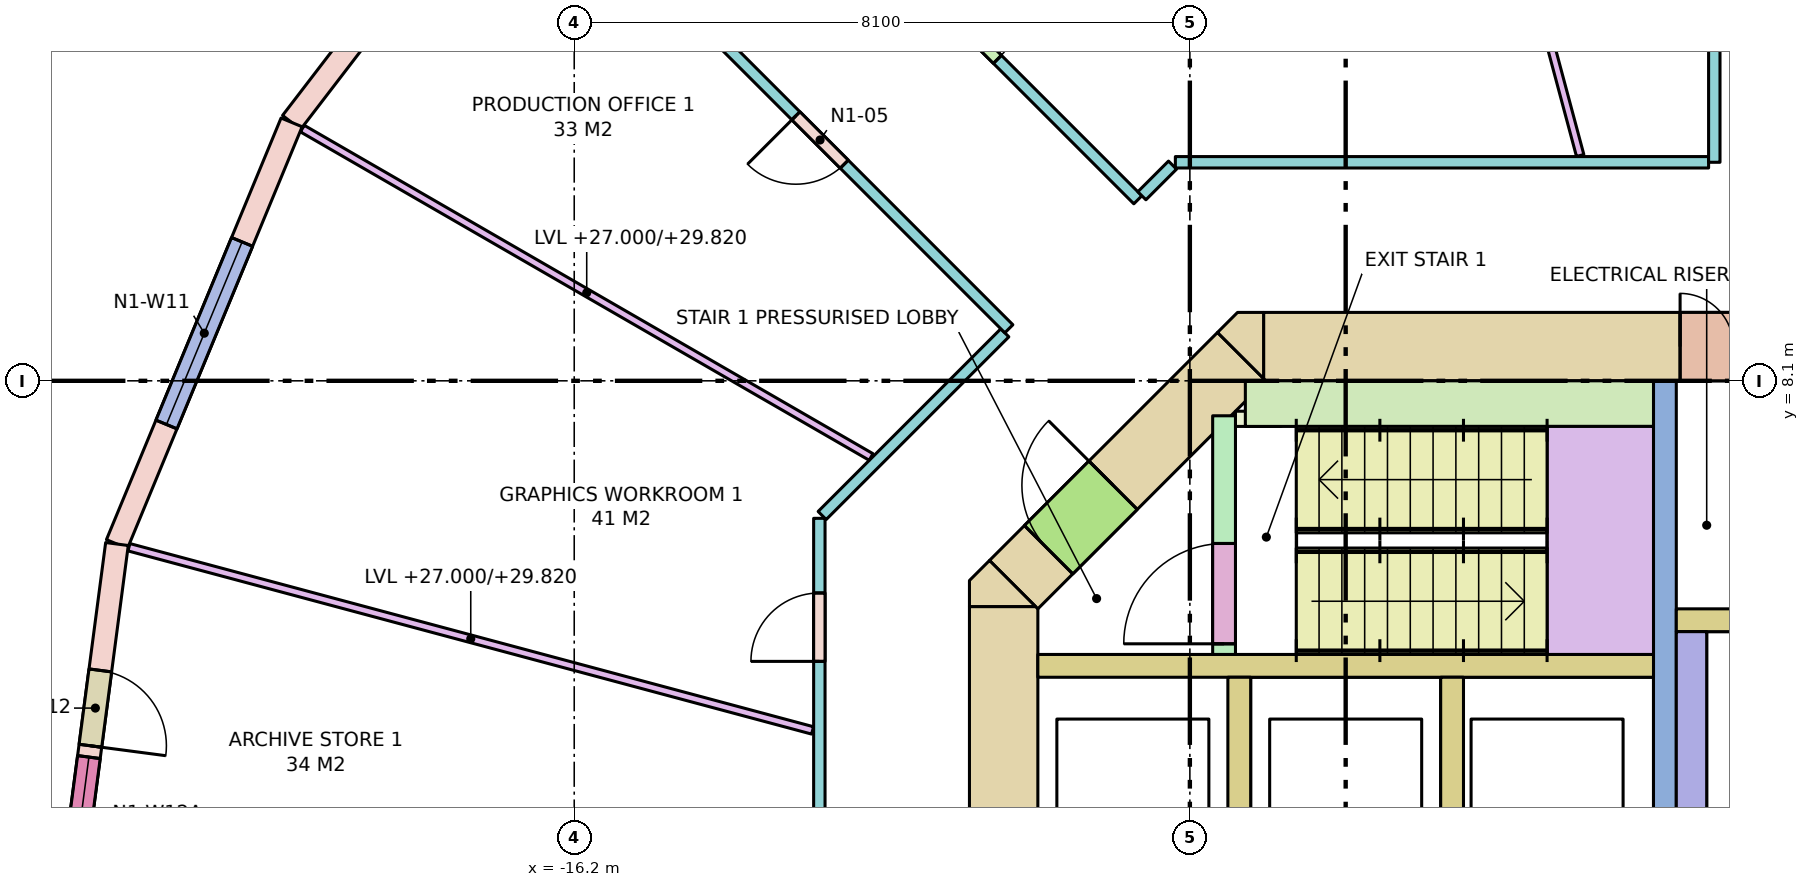
"""IFC4 building model, lengths in metres.
Left out: names, types, materials, properties, quantities, classifications, styles, units other than length and angle.
Written with IfcOpenShell. Run it as: python <this file> out.ifc"""

import sys

from ifc_helpers import new_model, si_unit, direction, frame, frame_2d, origin, place, context, subcontext, project, spatial, polyline, rectangle, outline, extrude, element, fill, save


model = new_model("IFC4")
c1 = context("Model", 3, precision=1e-05, world=origin(), true_north=direction((0.0, 1.0)))
c2 = subcontext(c1, "Body", "Model", "MODEL_VIEW")
j1 = project(units=[si_unit("LENGTHUNIT", "METRE"), si_unit("PLANEANGLEUNIT", "RADIAN")], contexts=[c1])
p1 = place(None, origin())
s1 = spatial("IfcSite", under=j1, at=p1, CompositionType="ELEMENT")
p2 = place(p1, origin())
s2 = spatial("IfcBuilding", under=s1, at=p2, CompositionType="ELEMENT")
p3 = place(p2, frame((0.0, 0.0, 27.0)))
s3 = spatial("IfcBuildingStorey", under=s2, at=p3, CompositionType="ELEMENT", Elevation=27.0)
p4 = place(p3, frame((-7.13, 8.55, -0.28), z_axis=(0.0, 0.0, 1.0), x_axis=(1.0, 0.0, 0.0)))
e1 = element("IfcWall", 1, at=p4, inside=s3, PredefinedType="SHEAR", context=c2, shape_type="SweptSolid", body=[
    extrude(rectangle(XDim=14.26, YDim=0.9, at=frame_2d((7.13, 0.0))), origin(), (0.0, 0.0, 1.0), 4.0),
])
p5 = place(p4, frame((5.48, 0.0, 0.28)))
e2 = element("IfcOpeningElement", 2, at=p5, cuts=e1, PredefinedType="OPENING", context=c2, shape_type="SweptSolid", body=[
    extrude(rectangle(XDim=0.7, YDim=2.1, at=frame_2d((0.35, 1.05))), frame((0.0, 0.46, 0.0), z_axis=(0.0, -1.0, 0.0), x_axis=(1.0, 0.0, 0.0)), (0.0, 0.0, 1.0), 0.92),
])
p6 = place(p4, frame((7.155, 0.0, 0.28)))
e3 = element("IfcOpeningElement", 3, at=p6, cuts=e1, PredefinedType="OPENING", context=c2, shape_type="SweptSolid", body=[
    extrude(rectangle(XDim=0.9, YDim=2.1, at=frame_2d((0.45, 1.05))), frame((0.0, 0.46, 0.0), z_axis=(0.0, -1.0, 0.0), x_axis=(1.0, 0.0, 0.0)), (0.0, 0.0, 1.0), 0.92),
])
p7 = place(p3, frame((-10.55, -5.13, -0.28), z_axis=(0.0, 0.0, 1.0), x_axis=(0.0, 1.0, 0.0)))
e4 = element("IfcWall", 4, at=p7, inside=s3, PredefinedType="SHEAR", context=c2, shape_type="SweptSolid", body=[
    extrude(rectangle(XDim=10.26, YDim=0.9, at=frame_2d((5.13, 0.0))), origin(), (0.0, 0.0, 1.0), 4.0),
])
p8 = place(p7, frame((4.13, 0.0, 0.28)))
e5 = element("IfcOpeningElement", 5, at=p8, cuts=e4, PredefinedType="OPENING", context=c2, shape_type="SweptSolid", body=[
    extrude(rectangle(XDim=2.0, YDim=2.1, at=frame_2d((1.0, 1.05))), frame((0.0, 0.46, 0.0), z_axis=(0.0, -1.0, 0.0), x_axis=(1.0, 0.0, 0.0)), (0.0, 0.0, 1.0), 0.92),
])
p9 = place(p3, frame((-10.418, 5.418, -0.28), z_axis=(0.0, 0.0, 1.0), x_axis=(0.707106781187, 0.707106781187, 0.0)))
e6 = element("IfcWall", 6, at=p9, inside=s3, PredefinedType="SHEAR", context=c2, shape_type="SweptSolid", body=[
    extrude(rectangle(XDim=4.243, YDim=0.9, at=frame_2d((2.121, 0.0))), origin(), (0.0, 0.0, 1.0), 4.0),
])
p10 = place(p9, frame((0.65, 0.0, 0.28)))
e7 = element("IfcOpeningElement", 7, at=p10, cuts=e6, PredefinedType="OPENING", context=c2, shape_type="SweptSolid", body=[
    extrude(rectangle(XDim=1.2, YDim=2.1, at=frame_2d((0.6, 1.05))), frame((0.0, 0.46, 0.0), z_axis=(0.0, -1.0, 0.0), x_axis=(1.0, 0.0, 0.0)), (0.0, 0.0, 1.0), 0.92),
])
p11 = place(p3, frame((0.0, 0.0, -0.28)))
e8 = element("IfcWall", 8, at=p11, inside=s3, PredefinedType="SHEAR", context=c2, shape_type="SweptSolid", body=[
    extrude(outline(polyline([(-10.736, 5.736), (-10.13, 5.13), (-11.0, 5.13), (-11.0, 5.473), (-10.736, 5.736)])), origin(), (0.0, 0.0, 1.0), 4.0),
])
p12 = place(p3, frame((0.0, 0.0, -0.28)))
e9 = element("IfcWall", 9, at=p12, inside=s3, PredefinedType="SHEAR", context=c2, shape_type="SweptSolid", body=[
    extrude(outline(polyline([(-7.473, 9.0), (-7.13, 9.0), (-7.13, 8.13), (-7.736, 8.736), (-7.473, 9.0)])), origin(), (0.0, 0.0, 1.0), 4.0),
])
p13 = place(p3, frame((-10.1, 4.35, 0.0), z_axis=(0.0, 0.0, 1.0), x_axis=(1.0, 0.0, 0.0)))
e10 = element("IfcWall", 10, at=p13, inside=s3, PredefinedType="SOLIDWALL", context=c2, shape_type="SweptSolid", body=[
    extrude(rectangle(XDim=8.1, YDim=0.3, at=frame_2d((4.05, 0.0))), origin(), (0.0, 0.0, 1.0), 3.72),
])
for number, where, z_axis, x_axis in (
    (11, (-7.45, 1.8, 0.0), (0.0, 0.0, 1.0), (0.0, 1.0, 0.0)),
    (12, (-4.65, 1.8, 0.0), (0.0, 0.0, 1.0), (0.0, 1.0, 0.0)),
):
    element("IfcWall", number, at=place(p3, frame(where, z_axis=z_axis, x_axis=x_axis)), inside=s3, PredefinedType="SOLIDWALL", context=c2, shape_type="SweptSolid", body=[
        extrude(rectangle(XDim=2.4, YDim=0.3, at=frame_2d((1.2, 0.0))), origin(), (0.0, 0.0, 1.0), 3.72),
    ])
p14 = place(p3, frame((-1.85, 1.5, 0.0), z_axis=(0.0, 0.0, 1.0), x_axis=(0.0, 1.0, 0.0)))
e13 = element("IfcWall", 13, at=p14, inside=s3, PredefinedType="SHEAR", context=c2, shape_type="SweptSolid", body=[
    extrude(rectangle(XDim=6.6, YDim=0.3, at=frame_2d((3.3, 0.0))), origin(), (0.0, 0.0, 1.0), 3.72),
])
p15 = place(p3, frame((-1.5, 1.8, 0.0), z_axis=(0.0, 0.0, 1.0), x_axis=(0.0, 1.0, 0.0)))
e14 = element("IfcWall", 14, at=p15, inside=s3, PredefinedType="SOLIDWALL", context=c2, shape_type="SweptSolid", body=[
    extrude(rectangle(XDim=3.0, YDim=0.4, at=frame_2d((1.5, 0.0))), origin(), (0.0, 0.0, 1.0), 3.72),
])
p16 = place(p3, frame((-1.7, 4.95, 0.0), z_axis=(0.0, 0.0, 1.0), x_axis=(1.0, 0.0, 0.0)))
e15 = element("IfcWall", 15, at=p16, inside=s3, PredefinedType="SOLIDWALL", context=c2, shape_type="SweptSolid", body=[
    extrude(rectangle(XDim=3.4, YDim=0.3, at=frame_2d((1.7, 0.0))), origin(), (0.0, 0.0, 1.0), 3.72),
])
p17 = place(p3, frame((-7.65, 4.5, 0.0), z_axis=(0.0, 0.0, 1.0), x_axis=(0.0, 1.0, 0.0)))
e16 = element("IfcWall", 16, at=p17, inside=s3, PredefinedType="SHEAR", context=c2, shape_type="SweptSolid", body=[
    extrude(rectangle(XDim=3.14, YDim=0.3, at=frame_2d((1.57, 0.0))), origin(), (0.0, 0.0, 1.0), 3.72),
])
p18 = place(p17, frame((0.14, 0.0, 0.0)))
e17 = element("IfcOpeningElement", 17, at=p18, cuts=e16, PredefinedType="OPENING", context=c2, shape_type="SweptSolid", body=[
    extrude(rectangle(XDim=1.32, YDim=2.1, at=frame_2d((0.66, 1.05))), frame((0.0, 0.16, 0.0), z_axis=(0.0, -1.0, 0.0), x_axis=(1.0, 0.0, 0.0)), (0.0, 0.0, 1.0), 0.32),
])
p19 = place(p3, frame((-7.37, 7.8, 0.0), z_axis=(0.0, 0.0, 1.0), x_axis=(1.0, 0.0, 0.0)))
e18 = element("IfcWall", 18, at=p19, inside=s3, PredefinedType="SHEAR", context=c2, shape_type="SweptSolid", body=[
    extrude(rectangle(XDim=5.37, YDim=0.6, at=frame_2d((2.685, 0.0))), origin(), (0.0, 0.0, 1.0), 3.72),
])
p20 = place(p3, frame((-7.5, 7.6, 0.0), z_axis=(0.0, 0.0, 1.0), x_axis=(1.0, 0.0, 0.0)))
e19 = element("IfcWall", 19, at=p20, inside=s3, PredefinedType="SHEAR", context=c2, shape_type="SweptSolid", body=[
    extrude(rectangle(XDim=0.6, YDim=0.2, at=frame_2d((0.3, 0.0))), origin(), (0.0, 0.0, 1.0), 3.72),
])
p21 = place(p3, frame((-16.263, 16.263, 0.0), z_axis=(0.0, 0.0, 1.0), x_axis=(-0.608778912074, -0.793339924758, 0.0)))
e20 = element("IfcWall", 20, at=p21, inside=s3, PredefinedType="STANDARD", context=c2, shape_type="SweptSolid", body=[
    extrude(rectangle(XDim=6.004, YDim=0.3, at=frame_2d((3.002, 0.0))), origin(), (0.0, 0.0, 1.0), 3.72),
])
p22 = place(p21, frame((1.677, 0.0, 0.0)))
e21 = element("IfcOpeningElement", 21, at=p22, cuts=e20, PredefinedType="OPENING", context=c2, shape_type="SweptSolid", body=[
    extrude(rectangle(XDim=1.0, YDim=2.4, at=frame_2d((0.5, 1.2))), frame((0.0, 0.16, 0.0), z_axis=(0.0, -1.0, 0.0), x_axis=(1.0, 0.0, 0.0)), (0.0, 0.0, 1.0), 0.32),
])
p23 = place(p21, frame((2.827, 0.0, 0.8)))
e22 = element("IfcOpeningElement", 22, at=p23, cuts=e20, PredefinedType="OPENING", context=c2, shape_type="SweptSolid", body=[
    extrude(rectangle(XDim=1.5, YDim=2.7, at=frame_2d((0.75, 1.35))), frame((0.0, 0.16, 0.0), z_axis=(0.0, -1.0, 0.0), x_axis=(1.0, 0.0, 0.0)), (0.0, 0.0, 1.0), 0.32),
])
p24 = place(p3, frame((-19.919, 11.5, 0.0), z_axis=(0.0, 0.0, 1.0), x_axis=(-0.382671411433, -0.923884511653, 0.0)))
e23 = element("IfcWall", 23, at=p24, inside=s3, PredefinedType="STANDARD", context=c2, shape_type="SweptSolid", body=[
    extrude(rectangle(XDim=6.004, YDim=0.3, at=frame_2d((3.002, 0.0))), origin(), (0.0, 0.0, 1.0), 3.72),
])
p25 = place(p24, frame((1.702, 0.0, 0.8)))
e24 = element("IfcOpeningElement", 24, at=p25, cuts=e23, PredefinedType="OPENING", context=c2, shape_type="SweptSolid", body=[
    extrude(rectangle(XDim=2.6, YDim=2.7, at=frame_2d((1.3, 1.35))), frame((0.0, 0.16, 0.0), z_axis=(0.0, -1.0, 0.0), x_axis=(1.0, 0.0, 0.0)), (0.0, 0.0, 1.0), 0.32),
])
p26 = place(p3, frame((-22.216, 5.953, 0.0), z_axis=(0.0, 0.0, 1.0), x_axis=(-0.130522880875, -0.991445297315, 0.0)))
e25 = element("IfcWall", 25, at=p26, inside=s3, PredefinedType="STANDARD", context=c2, shape_type="SweptSolid", body=[
    extrude(rectangle(XDim=6.004, YDim=0.3, at=frame_2d((3.002, 0.0))), origin(), (0.0, 0.0, 1.0), 3.72),
])
p27 = place(p26, frame((1.677, 0.0, 0.0)))
e26 = element("IfcOpeningElement", 26, at=p27, cuts=e25, PredefinedType="OPENING", context=c2, shape_type="SweptSolid", body=[
    extrude(rectangle(XDim=1.0, YDim=2.4, at=frame_2d((0.5, 1.2))), frame((0.0, 0.16, 0.0), z_axis=(0.0, -1.0, 0.0), x_axis=(1.0, 0.0, 0.0)), (0.0, 0.0, 1.0), 0.32),
])
p28 = place(p26, frame((2.827, 0.0, 0.8)))
e27 = element("IfcOpeningElement", 27, at=p28, cuts=e25, PredefinedType="OPENING", context=c2, shape_type="SweptSolid", body=[
    extrude(rectangle(XDim=1.5, YDim=2.7, at=frame_2d((0.75, 1.35))), frame((0.0, 0.16, 0.0), z_axis=(0.0, -1.0, 0.0), x_axis=(1.0, 0.0, 0.0)), (0.0, 0.0, 1.0), 0.32),
])
p29 = place(p3, frame((-12.975, 1.275, 0.0), z_axis=(0.0, 0.0, 1.0), x_axis=(0.0, 1.0, 0.0)))
e28 = element("IfcWall", 28, at=p29, inside=s3, PredefinedType="PARTITIONING", context=c2, shape_type="SweptSolid", body=[
    extrude(rectangle(XDim=5.016, YDim=0.15, at=frame_2d((2.508, 0.0))), origin(), (0.0, 0.0, 1.0), 2.82),
])
p30 = place(p29, frame((3.134, 0.0, 0.0)))
e29 = element("IfcOpeningElement", 29, at=p30, cuts=e28, PredefinedType="OPENING", context=c2, shape_type="SweptSolid", body=[
    extrude(rectangle(XDim=0.9, YDim=2.1, at=frame_2d((0.45, 1.05))), frame((0.0, 0.085, 0.0), z_axis=(0.0, -1.0, 0.0), x_axis=(1.0, 0.0, 0.0)), (0.0, 0.0, 1.0), 0.17),
])
p31 = place(p3, frame((-12.938, 6.328, 0.0), z_axis=(0.0, 0.0, 1.0), x_axis=(0.707106781187, 0.707106781187, 0.0)))
e30 = element("IfcWall", 30, at=p31, inside=s3, PredefinedType="PARTITIONING", context=c2, shape_type="SweptSolid", body=[
    extrude(rectangle(XDim=3.399, YDim=0.15, at=frame_2d((1.7, 0.0))), origin(), (0.0, 0.0, 1.0), 2.82),
])
p32 = place(p3, frame((-10.481, 8.784, 0.0), z_axis=(0.0, 0.0, 1.0), x_axis=(-0.707124155885, 0.707089406061, 0.0)))
e31 = element("IfcWall", 31, at=p32, inside=s3, PredefinedType="PARTITIONING", context=c2, shape_type="SweptSolid", body=[
    extrude(rectangle(XDim=7.026, YDim=0.15, at=frame_2d((3.513, 0.0))), origin(), (0.0, 0.0, 1.0), 3.72),
])
p33 = place(p32, frame((3.063, 0.0, 0.0)))
e32 = element("IfcOpeningElement", 32, at=p33, cuts=e31, PredefinedType="OPENING", context=c2, shape_type="SweptSolid", body=[
    extrude(rectangle(XDim=0.9, YDim=2.1, at=frame_2d((0.45, 1.05))), frame((0.0, 0.085, 0.0), z_axis=(0.0, -1.0, 0.0), x_axis=(1.0, 0.0, 0.0)), (0.0, 0.0, 1.0), 0.17),
])
p34 = place(p3, frame((-13.752, 15.449, 0.0), z_axis=(0.0, 0.0, 1.0), x_axis=(0.707089406061, -0.707124155885, 0.0)))
e33 = element("IfcWall", 33, at=p34, inside=s3, PredefinedType="PARTITIONING", context=c2, shape_type="SweptSolid", body=[
    extrude(rectangle(XDim=7.026, YDim=0.15, at=frame_2d((3.513, 0.0))), origin(), (0.0, 0.0, 1.0), 3.72),
])
p35 = place(p34, frame((2.613, 0.0, 0.0)))
e34 = element("IfcOpeningElement", 34, at=p35, cuts=e33, PredefinedType="OPENING", context=c2, shape_type="SweptSolid", body=[
    extrude(rectangle(XDim=1.8, YDim=2.1, at=frame_2d((0.9, 1.05))), frame((0.0, 0.085, 0.0), z_axis=(0.0, -1.0, 0.0), x_axis=(1.0, 0.0, 0.0)), (0.0, 0.0, 1.0), 0.17),
])
p36 = place(p3, frame((-8.731, 10.534, 0.0), z_axis=(0.0, 0.0, 1.0), x_axis=(0.707106781187, 0.707106781187, 0.0)))
e35 = element("IfcWall", 35, at=p36, inside=s3, PredefinedType="PARTITIONING", context=c2, shape_type="SweptSolid", body=[
    extrude(rectangle(XDim=0.571, YDim=0.15, at=frame_2d((0.285, 0.0))), origin(), (0.0, 0.0, 1.0), 3.72),
])
p37 = place(p3, frame((-8.291, 10.975, 0.0), z_axis=(0.0, 0.0, 1.0), x_axis=(1.0, 0.0, 0.0)))
e36 = element("IfcWall", 36, at=p37, inside=s3, PredefinedType="PARTITIONING", context=c2, shape_type="SweptSolid", body=[
    extrude(rectangle(XDim=7.016, YDim=0.15, at=frame_2d((3.508, 0.0))), origin(), (0.0, 0.0, 1.0), 2.82),
])
p38 = place(p3, frame((-1.2, 10.975, 0.0), z_axis=(0.0, 0.0, 1.0), x_axis=(0.0, 1.0, 0.0)))
e37 = element("IfcWall", 37, at=p38, inside=s3, PredefinedType="PARTITIONING", context=c2, shape_type="SweptSolid", body=[
    extrude(rectangle(XDim=9.674, YDim=0.15, at=frame_2d((4.837, 0.0))), origin(), (0.0, 0.0, 1.0), 3.72),
])
p39 = place(p38, frame((4.387, 0.0, 0.0)))
e38 = element("IfcOpeningElement", 38, at=p39, cuts=e37, PredefinedType="OPENING", context=c2, shape_type="SweptSolid", body=[
    extrude(rectangle(XDim=0.9, YDim=2.1, at=frame_2d((0.45, 1.05))), frame((0.0, 0.085, 0.0), z_axis=(0.0, -1.0, 0.0), x_axis=(1.0, 0.0, 0.0)), (0.0, 0.0, 1.0), 0.17),
])
p40 = place(p3, frame((-2.965, 11.064, 0.0), z_axis=(0.0, 0.0, 1.0), x_axis=(-0.258827930947, 0.965923445291, 0.0)))
e39 = element("IfcWall", 39, at=p40, inside=s3, PredefinedType="PARTITIONING", context=c2, shape_type="SweptSolid", body=[
    extrude(rectangle(XDim=11.382, YDim=0.1, at=frame_2d((5.691, 0.0))), origin(), (0.0, 0.0, 1.0), 2.82),
])
p41 = place(p3, frame((-12.294, 7.098, 0.0), z_axis=(0.0, 0.0, 1.0), x_axis=(-0.866010547425, 0.500025731086, 0.0)))
e40 = element("IfcWall", 40, at=p41, inside=s3, PredefinedType="PARTITIONING", context=c2, shape_type="SweptSolid", body=[
    extrude(rectangle(XDim=8.641, YDim=0.1, at=frame_2d((4.32, 0.0))), origin(), (0.0, 0.0, 1.0), 2.82),
])
p42 = place(p3, frame((-13.064, 3.5, 0.0), z_axis=(0.0, 0.0, 1.0), x_axis=(-0.965922655056, 0.258830880017, 0.0)))
e41 = element("IfcWall", 41, at=p42, inside=s3, PredefinedType="PARTITIONING", context=c2, shape_type="SweptSolid", body=[
    extrude(rectangle(XDim=9.312, YDim=0.1, at=frame_2d((4.656, 0.0))), origin(), (0.0, 0.0, 1.0), 2.82),
])
p43 = place(p25, origin())
e42 = element("IfcWindow", 42, at=p43, inside=s3, PartitioningType="SINGLE_PANEL", PredefinedType="WINDOW", context=c2, shape_type="SweptSolid", body=[
    extrude(rectangle(XDim=2.6, YDim=2.7, at=frame_2d((1.3, 1.35))), frame((0.0, 0.03, 0.0), z_axis=(0.0, -1.0, 0.0), x_axis=(1.0, 0.0, 0.0)), (0.0, 0.0, 1.0), 0.06),
])
fill(e24, e42)
p44 = place(p27, origin())
e43 = element("IfcDoor", 43, at=p44, inside=s3, OperationType="SINGLE_SWING_RIGHT", PredefinedType="DOOR", context=c2, shape_type="SweptSolid", body=[
    extrude(rectangle(XDim=1.0, YDim=2.4, at=frame_2d((0.5, 1.2))), frame((0.0, 0.025, 0.0), z_axis=(0.0, -1.0, 0.0), x_axis=(1.0, 0.0, 0.0)), (0.0, 0.0, 1.0), 0.05),
])
fill(e26, e43)
p45 = place(p28, origin())
e44 = element("IfcWindow", 44, at=p45, inside=s3, PartitioningType="SINGLE_PANEL", PredefinedType="WINDOW", context=c2, shape_type="SweptSolid", body=[
    extrude(rectangle(XDim=1.5, YDim=2.7, at=frame_2d((0.75, 1.35))), frame((0.0, 0.03, 0.0), z_axis=(0.0, -1.0, 0.0), x_axis=(1.0, 0.0, 0.0)), (0.0, 0.0, 1.0), 0.06),
])
fill(e27, e44)
p46 = place(p18, origin())
e45 = element("IfcDoor", 45, at=p46, inside=s3, OperationType="DOUBLE_DOOR_SINGLE_SWING", PredefinedType="DOOR", context=c2, shape_type="SweptSolid", body=[
    extrude(rectangle(XDim=1.32, YDim=2.1, at=frame_2d((0.66, 1.05))), frame((0.0, 0.025, 0.0), z_axis=(0.0, -1.0, 0.0), x_axis=(1.0, 0.0, 0.0)), (0.0, 0.0, 1.0), 0.05),
])
fill(e17, e45)
p47 = place(p10, origin())
e46 = element("IfcDoor", 46, at=p47, inside=s3, OperationType="SINGLE_SWING_RIGHT", PredefinedType="DOOR", context=c2, shape_type="SweptSolid", body=[
    extrude(rectangle(XDim=1.2, YDim=2.1, at=frame_2d((0.6, 1.05))), frame((0.0, 0.025, 0.0), z_axis=(0.0, -1.0, 0.0), x_axis=(1.0, 0.0, 0.0)), (0.0, 0.0, 1.0), 0.05),
])
fill(e7, e46)
p48 = place(p5, origin())
e47 = element("IfcDoor", 47, at=p48, inside=s3, OperationType="SINGLE_SWING_LEFT", PredefinedType="DOOR", context=c2, shape_type="SweptSolid", body=[
    extrude(rectangle(XDim=0.7, YDim=2.1, at=frame_2d((0.35, 1.05))), frame((0.0, 0.025, 0.0), z_axis=(0.0, -1.0, 0.0), x_axis=(1.0, 0.0, 0.0)), (0.0, 0.0, 1.0), 0.05),
])
fill(e2, e47)
p49 = place(p35, origin())
e48 = element("IfcDoor", 48, at=p49, inside=s3, OperationType="DOUBLE_DOOR_SINGLE_SWING", PredefinedType="DOOR", context=c2, shape_type="SweptSolid", body=[
    extrude(rectangle(XDim=1.8, YDim=2.1, at=frame_2d((0.9, 1.05))), frame((0.0, 0.025, 0.0), z_axis=(0.0, -1.0, 0.0), x_axis=(1.0, 0.0, 0.0)), (0.0, 0.0, 1.0), 0.05),
])
fill(e34, e48)
p50 = place(p33, origin())
e49 = element("IfcDoor", 49, at=p50, inside=s3, OperationType="SINGLE_SWING_RIGHT", PredefinedType="DOOR", context=c2, shape_type="SweptSolid", body=[
    extrude(rectangle(XDim=0.9, YDim=2.1, at=frame_2d((0.45, 1.05))), frame((0.0, 0.025, 0.0), z_axis=(0.0, -1.0, 0.0), x_axis=(1.0, 0.0, 0.0)), (0.0, 0.0, 1.0), 0.05),
])
fill(e32, e49)
p51 = place(p30, origin())
e50 = element("IfcDoor", 50, at=p51, inside=s3, OperationType="SINGLE_SWING_LEFT", PredefinedType="DOOR", context=c2, shape_type="SweptSolid", body=[
    extrude(rectangle(XDim=0.9, YDim=2.1, at=frame_2d((0.45, 1.05))), frame((0.0, 0.025, 0.0), z_axis=(0.0, -1.0, 0.0), x_axis=(1.0, 0.0, 0.0)), (0.0, 0.0, 1.0), 0.05),
])
fill(e29, e50)
save(model, sys.argv[1])
